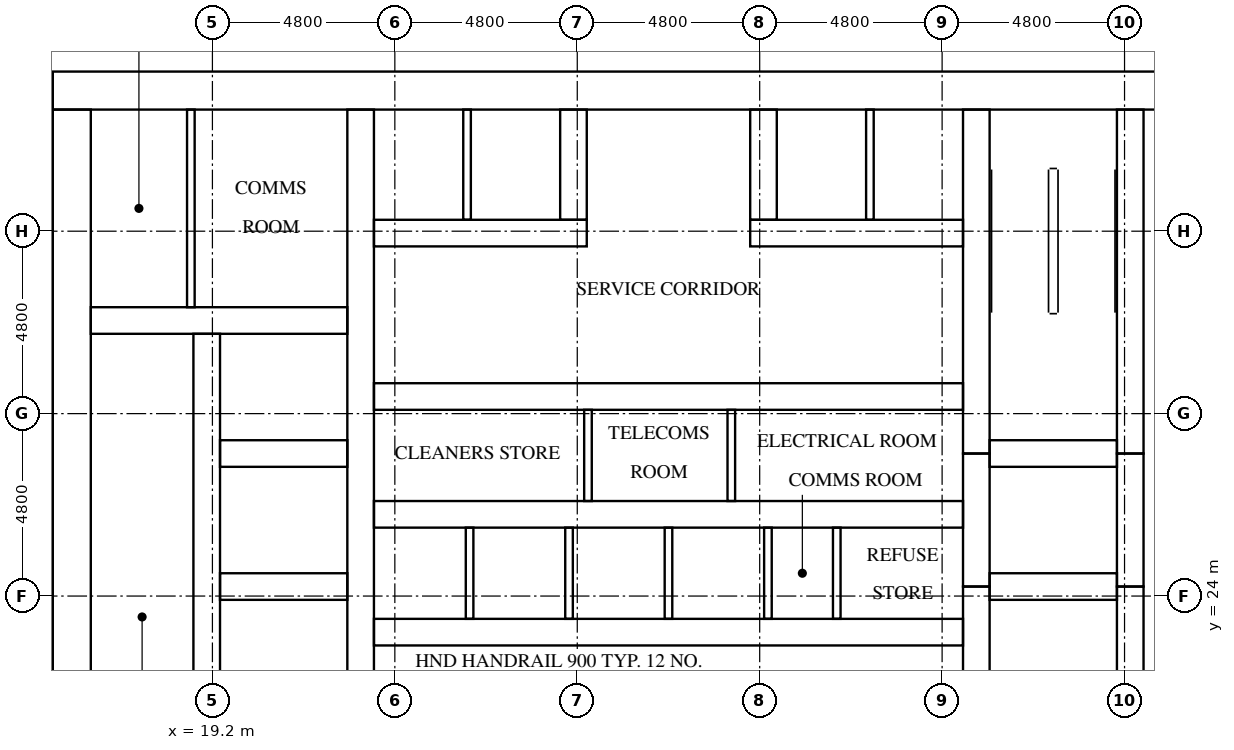
"""IFC4 building model, lengths in metres.
Left out: names, types, materials, properties, quantities, classifications, styles, units other than length and angle.
Written with IfcOpenShell. Run it as: python <this file> out.ifc"""

import sys

from ifc_helpers import new_model, si_unit, direction, frame, frame_2d, origin, place, context, subcontext, project, spatial, rectangle, extrude, element, fill, save


model = new_model("IFC4")
c1 = context("Model", 3, precision=1e-05, world=origin(), true_north=direction((0.0, 1.0)))
c2 = subcontext(c1, "Body", "Model", "MODEL_VIEW")
j1 = project(units=[si_unit("LENGTHUNIT", "METRE"), si_unit("PLANEANGLEUNIT", "RADIAN")], contexts=[c1])
p1 = place(None, origin())
s1 = spatial("IfcSite", under=j1, at=p1, CompositionType="ELEMENT")
p2 = place(p1, origin())
s2 = spatial("IfcBuilding", under=s1, at=p2, CompositionType="ELEMENT")
p3 = place(p2, frame((0.0, 0.0, 6.0)))
s3 = spatial("IfcBuildingStorey", under=s2, at=p3, CompositionType="ELEMENT", Elevation=6.0)
p4 = place(p3, frame((15.0, 37.3, 0.0), z_axis=(0.0, 0.0, 1.0), x_axis=(1.0, 0.0, 0.0)))
e1 = element("IfcWall", 1, at=p4, inside=s3, PredefinedType="SHEAR", context=c2, shape_type="SweptSolid", body=[
    extrude(rectangle(XDim=32.4, YDim=1.0, at=frame_2d((16.2, 0.0))), origin(), (0.0, 0.0, 1.0), 4.2),
])
p5 = place(p4, frame((15.3, 0.0, 0.0)))
e2 = element("IfcOpeningElement", 2, at=p5, cuts=e1, PredefinedType="OPENING", context=c2, shape_type="SweptSolid", body=[
    extrude(rectangle(XDim=1.8, YDim=2.1, at=frame_2d((0.9, 1.05))), frame((0.0, 0.51, 0.0), z_axis=(0.0, -1.0, 0.0), x_axis=(1.0, 0.0, 0.0)), (0.0, 0.0, 1.0), 1.02),
])
p6 = place(p4, frame((1.766, 0.0, 0.0)))
e3 = element("IfcOpeningElement", 3, at=p6, cuts=e1, PredefinedType="OPENING", context=c2, shape_type="SweptSolid", body=[
    extrude(rectangle(XDim=1.0, YDim=2.1, at=frame_2d((0.5, 1.05))), frame((0.0, 0.51, 0.0), z_axis=(0.0, -1.0, 0.0), x_axis=(1.0, 0.0, 0.0)), (0.0, 0.0, 1.0), 1.02),
])
p7 = place(p4, frame((5.241, 0.0, 0.0)))
e4 = element("IfcOpeningElement", 4, at=p7, cuts=e1, PredefinedType="OPENING", context=c2, shape_type="SweptSolid", body=[
    extrude(rectangle(XDim=1.0, YDim=2.1, at=frame_2d((0.5, 1.05))), frame((0.0, 0.51, 0.0), z_axis=(0.0, -1.0, 0.0), x_axis=(1.0, 0.0, 0.0)), (0.0, 0.0, 1.0), 1.02),
])
p8 = place(p3, frame((15.5, 16.0, 0.0), z_axis=(0.0, 0.0, 1.0), x_axis=(0.0, 1.0, 0.0)))
e5 = element("IfcWall", 5, at=p8, inside=s3, PredefinedType="SHEAR", context=c2, shape_type="SweptSolid", body=[
    extrude(rectangle(XDim=20.8, YDim=1.0, at=frame_2d((10.4, 0.0))), origin(), (0.0, 0.0, 1.0), 4.2),
])
p9 = place(p8, frame((4.76, 0.0, 0.0)))
e6 = element("IfcOpeningElement", 6, at=p9, cuts=e5, PredefinedType="OPENING", context=c2, shape_type="SweptSolid", body=[
    extrude(rectangle(XDim=1.2, YDim=2.1, at=frame_2d((0.6, 1.05))), frame((0.0, 0.51, 0.0), z_axis=(0.0, -1.0, 0.0), x_axis=(1.0, 0.0, 0.0)), (0.0, 0.0, 1.0), 1.02),
])
p10 = place(p3, frame((19.05, 16.0, 0.0), z_axis=(0.0, 0.0, 1.0), x_axis=(0.0, 1.0, 0.0)))
e7 = element("IfcWall", 7, at=p10, inside=s3, PredefinedType="SHEAR", context=c2, shape_type="SweptSolid", body=[
    extrude(rectangle(XDim=14.9, YDim=0.7, at=frame_2d((7.45, 0.0))), origin(), (0.0, 0.0, 1.0), 4.2),
])
p11 = place(p10, frame((9.45, 0.0, 0.0)))
e8 = element("IfcOpeningElement", 8, at=p11, cuts=e7, PredefinedType="OPENING", context=c2, shape_type="SweptSolid", body=[
    extrude(rectangle(XDim=1.1, YDim=2.1, at=frame_2d((0.55, 1.05))), frame((0.0, 0.36, 0.0), z_axis=(0.0, -1.0, 0.0), x_axis=(1.0, 0.0, 0.0)), (0.0, 0.0, 1.0), 0.72),
])
p12 = place(p10, frame((12.95, 0.0, 0.0)))
e9 = element("IfcOpeningElement", 9, at=p12, cuts=e7, PredefinedType="OPENING", context=c2, shape_type="SweptSolid", body=[
    extrude(rectangle(XDim=1.1, YDim=2.1, at=frame_2d((0.55, 1.05))), frame((0.0, 0.36, 0.0), z_axis=(0.0, -1.0, 0.0), x_axis=(1.0, 0.0, 0.0)), (0.0, 0.0, 1.0), 0.72),
])
p13 = place(p10, frame((0.2, 0.0, 0.0)))
e10 = element("IfcOpeningElement", 10, at=p13, cuts=e7, PredefinedType="OPENING", context=c2, shape_type="SweptSolid", body=[
    extrude(rectangle(XDim=1.2, YDim=2.1, at=frame_2d((0.6, 1.05))), frame((0.0, 0.36, 0.0), z_axis=(0.0, -1.0, 0.0), x_axis=(1.0, 0.0, 0.0)), (0.0, 0.0, 1.0), 0.72),
])
p14 = place(p3, frame((23.1, 16.0, 0.0), z_axis=(0.0, 0.0, 1.0), x_axis=(0.0, 1.0, 0.0)))
e11 = element("IfcWall", 11, at=p14, inside=s3, PredefinedType="SHEAR", context=c2, shape_type="SweptSolid", body=[
    extrude(rectangle(XDim=20.8, YDim=0.7, at=frame_2d((10.4, 0.0))), origin(), (0.0, 0.0, 1.0), 4.2),
])
p15 = place(p3, frame((39.3, 16.0, 0.0), z_axis=(0.0, 0.0, 1.0), x_axis=(0.0, 1.0, 0.0)))
e12 = element("IfcWall", 12, at=p15, inside=s3, PredefinedType="SHEAR", context=c2, shape_type="SweptSolid", body=[
    extrude(rectangle(XDim=8.25, YDim=0.7, at=frame_2d((4.125, 0.0))), origin(), (0.0, 0.0, 1.0), 4.2),
])
p16 = place(p3, frame((39.3, 24.25, 0.0), z_axis=(0.0, 0.0, 1.0), x_axis=(0.0, 1.0, 0.0)))
e13 = element("IfcWall", 13, at=p16, inside=s3, PredefinedType="SHEAR", context=c2, shape_type="SweptSolid", body=[
    extrude(rectangle(XDim=3.5, YDim=0.7, at=frame_2d((1.75, 0.0))), origin(), (0.0, 0.0, 1.0), 4.2),
])
p17 = place(p3, frame((39.3, 27.75, 0.0), z_axis=(0.0, 0.0, 1.0), x_axis=(0.0, 1.0, 0.0)))
e14 = element("IfcWall", 14, at=p17, inside=s3, PredefinedType="SHEAR", context=c2, shape_type="SweptSolid", body=[
    extrude(rectangle(XDim=9.05, YDim=0.7, at=frame_2d((4.525, 0.0))), origin(), (0.0, 0.0, 1.0), 4.2),
])
p18 = place(p3, frame((43.35, 16.0, 0.0), z_axis=(0.0, 0.0, 1.0), x_axis=(0.0, 1.0, 0.0)))
e15 = element("IfcWall", 15, at=p18, inside=s3, PredefinedType="SHEAR", context=c2, shape_type="SweptSolid", body=[
    extrude(rectangle(XDim=8.25, YDim=0.7, at=frame_2d((4.125, 0.0))), origin(), (0.0, 0.0, 1.0), 4.2),
])
p19 = place(p18, frame((0.2, 0.0, 0.0)))
e16 = element("IfcOpeningElement", 16, at=p19, cuts=e15, PredefinedType="OPENING", context=c2, shape_type="SweptSolid", body=[
    extrude(rectangle(XDim=1.2, YDim=2.1, at=frame_2d((0.6, 1.05))), frame((0.0, 0.36, 0.0), z_axis=(0.0, -1.0, 0.0), x_axis=(1.0, 0.0, 0.0)), (0.0, 0.0, 1.0), 0.72),
])
p20 = place(p3, frame((43.35, 24.25, 0.0), z_axis=(0.0, 0.0, 1.0), x_axis=(0.0, 1.0, 0.0)))
e17 = element("IfcWall", 17, at=p20, inside=s3, PredefinedType="SHEAR", context=c2, shape_type="SweptSolid", body=[
    extrude(rectangle(XDim=3.5, YDim=0.7, at=frame_2d((1.75, 0.0))), origin(), (0.0, 0.0, 1.0), 4.2),
])
p21 = place(p20, frame((1.2, 0.0, 0.0)))
e18 = element("IfcOpeningElement", 18, at=p21, cuts=e17, PredefinedType="OPENING", context=c2, shape_type="SweptSolid", body=[
    extrude(rectangle(XDim=1.1, YDim=2.1, at=frame_2d((0.55, 1.05))), frame((0.0, 0.36, 0.0), z_axis=(0.0, -1.0, 0.0), x_axis=(1.0, 0.0, 0.0)), (0.0, 0.0, 1.0), 0.72),
])
p22 = place(p3, frame((43.35, 27.75, 0.0), z_axis=(0.0, 0.0, 1.0), x_axis=(0.0, 1.0, 0.0)))
e19 = element("IfcWall", 19, at=p22, inside=s3, PredefinedType="SHEAR", context=c2, shape_type="SweptSolid", body=[
    extrude(rectangle(XDim=9.05, YDim=0.7, at=frame_2d((4.525, 0.0))), origin(), (0.0, 0.0, 1.0), 4.2),
])
p23 = place(p22, frame((7.65, 0.0, 0.0)))
e20 = element("IfcOpeningElement", 20, at=p23, cuts=e19, PredefinedType="OPENING", context=c2, shape_type="SweptSolid", body=[
    extrude(rectangle(XDim=1.2, YDim=2.1, at=frame_2d((0.6, 1.05))), frame((0.0, 0.36, 0.0), z_axis=(0.0, -1.0, 0.0), x_axis=(1.0, 0.0, 0.0)), (0.0, 0.0, 1.0), 0.72),
])
for number, where, z_axis, x_axis in (
    (21, (19.4, 24.25, 0.0), (0.0, 0.0, 1.0), (1.0, 0.0, 0.0)),
    (22, (19.4, 27.75, 0.0), (0.0, 0.0, 1.0), (1.0, 0.0, 0.0)),
):
    element("IfcWall", number, at=place(p3, frame(where, z_axis=z_axis, x_axis=x_axis)), inside=s3, PredefinedType="SHEAR", context=c2, shape_type="SweptSolid", body=[
        extrude(rectangle(XDim=3.35, YDim=0.7, at=frame_2d((1.675, 0.0))), origin(), (0.0, 0.0, 1.0), 4.2),
    ])
p24 = place(p3, frame((16.0, 31.25, 0.0), z_axis=(0.0, 0.0, 1.0), x_axis=(1.0, 0.0, 0.0)))
e23 = element("IfcWall", 23, at=p24, inside=s3, PredefinedType="SHEAR", context=c2, shape_type="SweptSolid", body=[
    extrude(rectangle(XDim=6.75, YDim=0.7, at=frame_2d((3.375, 0.0))), origin(), (0.0, 0.0, 1.0), 4.2),
])
for number, where, z_axis, x_axis in (
    (24, (39.65, 24.25, 0.0), (0.0, 0.0, 1.0), (1.0, 0.0, 0.0)),
    (25, (39.65, 27.75, 0.0), (0.0, 0.0, 1.0), (1.0, 0.0, 0.0)),
):
    element("IfcWall", number, at=place(p3, frame(where, z_axis=z_axis, x_axis=x_axis)), inside=s3, PredefinedType="SHEAR", context=c2, shape_type="SweptSolid", body=[
        extrude(rectangle(XDim=3.35, YDim=0.7, at=frame_2d((1.675, 0.0))), origin(), (0.0, 0.0, 1.0), 4.2),
    ])
p25 = place(p3, frame((23.45, 23.05, 0.0), z_axis=(0.0, 0.0, 1.0), x_axis=(1.0, 0.0, 0.0)))
e26 = element("IfcWall", 26, at=p25, inside=s3, PredefinedType="SHEAR", context=c2, shape_type="SweptSolid", body=[
    extrude(rectangle(XDim=15.5, YDim=0.7, at=frame_2d((7.75, 0.0))), origin(), (0.0, 0.0, 1.0), 4.2),
])
p26 = place(p25, frame((0.658, 0.0, 0.0)))
e27 = element("IfcOpeningElement", 27, at=p26, cuts=e26, PredefinedType="OPENING", context=c2, shape_type="SweptSolid", body=[
    extrude(rectangle(XDim=1.1, YDim=2.1, at=frame_2d((0.55, 1.05))), frame((0.0, 0.36, 0.0), z_axis=(0.0, -1.0, 0.0), x_axis=(1.0, 0.0, 0.0)), (0.0, 0.0, 1.0), 0.72),
])
p27 = place(p25, frame((3.275, 0.0, 0.0)))
e28 = element("IfcOpeningElement", 28, at=p27, cuts=e26, PredefinedType="OPENING", context=c2, shape_type="SweptSolid", body=[
    extrude(rectangle(XDim=1.1, YDim=2.1, at=frame_2d((0.55, 1.05))), frame((0.0, 0.36, 0.0), z_axis=(0.0, -1.0, 0.0), x_axis=(1.0, 0.0, 0.0)), (0.0, 0.0, 1.0), 0.72),
])
p28 = place(p25, frame((10.772, 0.0, 0.0)))
e29 = element("IfcOpeningElement", 29, at=p28, cuts=e26, PredefinedType="OPENING", context=c2, shape_type="SweptSolid", body=[
    extrude(rectangle(XDim=1.0, YDim=2.1, at=frame_2d((0.5, 1.05))), frame((0.0, 0.36, 0.0), z_axis=(0.0, -1.0, 0.0), x_axis=(1.0, 0.0, 0.0)), (0.0, 0.0, 1.0), 0.72),
])
p29 = place(p25, frame((13.389, 0.0, 0.0)))
e30 = element("IfcOpeningElement", 30, at=p29, cuts=e26, PredefinedType="OPENING", context=c2, shape_type="SweptSolid", body=[
    extrude(rectangle(XDim=1.0, YDim=2.1, at=frame_2d((0.5, 1.05))), frame((0.0, 0.36, 0.0), z_axis=(0.0, -1.0, 0.0), x_axis=(1.0, 0.0, 0.0)), (0.0, 0.0, 1.0), 0.72),
])
p30 = place(p3, frame((23.45, 26.15, 0.0), z_axis=(0.0, 0.0, 1.0), x_axis=(1.0, 0.0, 0.0)))
e31 = element("IfcWall", 31, at=p30, inside=s3, PredefinedType="SHEAR", context=c2, shape_type="SweptSolid", body=[
    extrude(rectangle(XDim=15.5, YDim=0.7, at=frame_2d((7.75, 0.0))), origin(), (0.0, 0.0, 1.0), 4.2),
])
p31 = place(p3, frame((23.45, 29.25, 0.0), z_axis=(0.0, 0.0, 1.0), x_axis=(1.0, 0.0, 0.0)))
e32 = element("IfcWall", 32, at=p31, inside=s3, PredefinedType="SHEAR", context=c2, shape_type="SweptSolid", body=[
    extrude(rectangle(XDim=15.5, YDim=0.7, at=frame_2d((7.75, 0.0))), origin(), (0.0, 0.0, 1.0), 4.2),
])
p32 = place(p31, frame((2.266, 0.0, 0.0)))
e33 = element("IfcOpeningElement", 33, at=p32, cuts=e32, PredefinedType="OPENING", context=c2, shape_type="SweptSolid", body=[
    extrude(rectangle(XDim=1.0, YDim=2.1, at=frame_2d((0.5, 1.05))), frame((0.0, 0.36, 0.0), z_axis=(0.0, -1.0, 0.0), x_axis=(1.0, 0.0, 0.0)), (0.0, 0.0, 1.0), 0.72),
])
p33 = place(p31, frame((7.018, 0.0, 0.0)))
e34 = element("IfcOpeningElement", 34, at=p33, cuts=e32, PredefinedType="OPENING", context=c2, shape_type="SweptSolid", body=[
    extrude(rectangle(XDim=1.0, YDim=2.1, at=frame_2d((0.5, 1.05))), frame((0.0, 0.36, 0.0), z_axis=(0.0, -1.0, 0.0), x_axis=(1.0, 0.0, 0.0)), (0.0, 0.0, 1.0), 0.72),
])
p34 = place(p31, frame((12.002, 0.0, 0.0)))
e35 = element("IfcOpeningElement", 35, at=p34, cuts=e32, PredefinedType="OPENING", context=c2, shape_type="SweptSolid", body=[
    extrude(rectangle(XDim=1.0, YDim=2.1, at=frame_2d((0.5, 1.05))), frame((0.0, 0.36, 0.0), z_axis=(0.0, -1.0, 0.0), x_axis=(1.0, 0.0, 0.0)), (0.0, 0.0, 1.0), 0.72),
])
p35 = place(p3, frame((23.45, 33.55, 0.0), z_axis=(0.0, 0.0, 1.0), x_axis=(1.0, 0.0, 0.0)))
e36 = element("IfcWall", 36, at=p35, inside=s3, PredefinedType="SHEAR", context=c2, shape_type="SweptSolid", body=[
    extrude(rectangle(XDim=5.6, YDim=0.7, at=frame_2d((2.8, 0.0))), origin(), (0.0, 0.0, 1.0), 4.2),
])
p36 = place(p3, frame((33.35, 33.55, 0.0), z_axis=(0.0, 0.0, 1.0), x_axis=(1.0, 0.0, 0.0)))
e37 = element("IfcWall", 37, at=p36, inside=s3, PredefinedType="SHEAR", context=c2, shape_type="SweptSolid", body=[
    extrude(rectangle(XDim=5.6, YDim=0.7, at=frame_2d((2.8, 0.0))), origin(), (0.0, 0.0, 1.0), 4.2),
])
for number, where, z_axis, x_axis in (
    (38, (28.7, 33.9, 0.0), (0.0, 0.0, 1.0), (0.0, 1.0, 0.0)),
    (39, (33.7, 33.9, 0.0), (0.0, 0.0, 1.0), (0.0, 1.0, 0.0)),
):
    element("IfcWall", number, at=place(p3, frame(where, z_axis=z_axis, x_axis=x_axis)), inside=s3, PredefinedType="SHEAR", context=c2, shape_type="SweptSolid", body=[
        extrude(rectangle(XDim=2.9, YDim=0.7, at=frame_2d((1.45, 0.0))), origin(), (0.0, 0.0, 1.0), 4.2),
    ])
for number, where, z_axis, x_axis in (
    (40, (25.967, 23.4, 0.0), (0.0, 0.0, 1.0), (0.0, 1.0, 0.0)),
    (41, (28.583, 23.4, 0.0), (0.0, 0.0, 1.0), (0.0, 1.0, 0.0)),
    (42, (31.2, 23.4, 0.0), (0.0, 0.0, 1.0), (0.0, 1.0, 0.0)),
    (43, (33.817, 23.4, 0.0), (0.0, 0.0, 1.0), (0.0, 1.0, 0.0)),
):
    element("IfcWall", number, at=place(p3, frame(where, z_axis=z_axis, x_axis=x_axis)), inside=s3, PredefinedType="SOLIDWALL", context=c2, shape_type="SweptSolid", body=[
        extrude(rectangle(XDim=2.4, YDim=0.2, at=frame_2d((1.2, 0.0))), origin(), (0.0, 0.0, 1.0), 4.2),
    ])
for number, where, z_axis, x_axis in (
    (44, (25.9, 33.9, 0.0), (0.0, 0.0, 1.0), (0.0, 1.0, 0.0)),
    (45, (36.5, 33.9, 0.0), (0.0, 0.0, 1.0), (0.0, 1.0, 0.0)),
):
    element("IfcWall", number, at=place(p3, frame(where, z_axis=z_axis, x_axis=x_axis)), inside=s3, PredefinedType="SOLIDWALL", context=c2, shape_type="SweptSolid", body=[
        extrude(rectangle(XDim=2.9, YDim=0.2, at=frame_2d((1.45, 0.0))), origin(), (0.0, 0.0, 1.0), 4.2),
    ])
p37 = place(p3, frame((18.633, 31.6, 0.0), z_axis=(0.0, 0.0, 1.0), x_axis=(0.0, 1.0, 0.0)))
e46 = element("IfcWall", 46, at=p37, inside=s3, PredefinedType="PARTITIONING", context=c2, shape_type="SweptSolid", body=[
    extrude(rectangle(XDim=5.2, YDim=0.2, at=frame_2d((2.6, 0.0))), origin(), (0.0, 0.0, 1.0), 4.2),
])
p38 = place(p3, frame((35.628, 23.4, 0.0), z_axis=(0.0, 0.0, 1.0), x_axis=(0.0, 1.0, 0.0)))
e47 = element("IfcWall", 47, at=p38, inside=s3, PredefinedType="PARTITIONING", context=c2, shape_type="SweptSolid", body=[
    extrude(rectangle(XDim=2.4, YDim=0.2, at=frame_2d((1.2, 0.0))), origin(), (0.0, 0.0, 1.0), 4.2),
])
for number, where, z_axis, x_axis in (
    (48, (29.082, 26.5, 0.0), (0.0, 0.0, 1.0), (0.0, 1.0, 0.0)),
    (49, (32.853, 26.5, 0.0), (0.0, 0.0, 1.0), (0.0, 1.0, 0.0)),
):
    element("IfcWall", number, at=place(p3, frame(where, z_axis=z_axis, x_axis=x_axis)), inside=s3, PredefinedType="PARTITIONING", context=c2, shape_type="SweptSolid", body=[
        extrude(rectangle(XDim=2.4, YDim=0.2, at=frame_2d((1.2, 0.0))), origin(), (0.0, 0.0, 1.0), 4.2),
    ])
p39 = place(p26, origin())
e50 = element("IfcDoor", 50, at=p39, inside=s3, OperationType="DOUBLE_DOOR_SLIDING", PredefinedType="DOOR", context=c2, shape_type="SweptSolid", body=[
    extrude(rectangle(XDim=1.1, YDim=2.1, at=frame_2d((0.55, 1.05))), frame((0.0, 0.025, 0.0), z_axis=(0.0, -1.0, 0.0), x_axis=(1.0, 0.0, 0.0)), (0.0, 0.0, 1.0), 0.05),
])
fill(e27, e50)
p40 = place(p27, origin())
e51 = element("IfcDoor", 51, at=p40, inside=s3, OperationType="DOUBLE_DOOR_SLIDING", PredefinedType="DOOR", context=c2, shape_type="SweptSolid", body=[
    extrude(rectangle(XDim=1.1, YDim=2.1, at=frame_2d((0.55, 1.05))), frame((0.0, 0.025, 0.0), z_axis=(0.0, -1.0, 0.0), x_axis=(1.0, 0.0, 0.0)), (0.0, 0.0, 1.0), 0.05),
])
fill(e28, e51)
p41 = place(p11, origin())
e52 = element("IfcDoor", 52, at=p41, inside=s3, OperationType="DOUBLE_DOOR_SLIDING", PredefinedType="DOOR", context=c2, shape_type="SweptSolid", body=[
    extrude(rectangle(XDim=1.1, YDim=2.1, at=frame_2d((0.55, 1.05))), frame((0.0, 0.025, 0.0), z_axis=(0.0, -1.0, 0.0), x_axis=(1.0, 0.0, 0.0)), (0.0, 0.0, 1.0), 0.05),
])
fill(e8, e52)
p42 = place(p12, origin())
e53 = element("IfcDoor", 53, at=p42, inside=s3, OperationType="DOUBLE_DOOR_SLIDING", PredefinedType="DOOR", context=c2, shape_type="SweptSolid", body=[
    extrude(rectangle(XDim=1.1, YDim=2.1, at=frame_2d((0.55, 1.05))), frame((0.0, 0.025, 0.0), z_axis=(0.0, -1.0, 0.0), x_axis=(1.0, 0.0, 0.0)), (0.0, 0.0, 1.0), 0.05),
])
fill(e9, e53)
p43 = place(p21, origin())
e54 = element("IfcDoor", 54, at=p43, inside=s3, OperationType="DOUBLE_DOOR_SLIDING", PredefinedType="DOOR", context=c2, shape_type="SweptSolid", body=[
    extrude(rectangle(XDim=1.1, YDim=2.1, at=frame_2d((0.55, 1.05))), frame((0.0, 0.025, 0.0), z_axis=(0.0, -1.0, 0.0), x_axis=(1.0, 0.0, 0.0)), (0.0, 0.0, 1.0), 0.05),
])
fill(e18, e54)
p44 = place(p23, origin())
e55 = element("IfcDoor", 55, at=p44, inside=s3, OperationType="SINGLE_SWING_LEFT", PredefinedType="DOOR", context=c2, shape_type="SweptSolid", body=[
    extrude(rectangle(XDim=1.2, YDim=2.1, at=frame_2d((0.6, 1.05))), frame((0.0, 0.025, 0.0), z_axis=(0.0, -1.0, 0.0), x_axis=(1.0, 0.0, 0.0)), (0.0, 0.0, 1.0), 0.05),
])
fill(e20, e55)
p45 = place(p5, origin())
e56 = element("IfcDoor", 56, at=p45, inside=s3, OperationType="DOUBLE_DOOR_SINGLE_SWING", PredefinedType="DOOR", context=c2, shape_type="SweptSolid", body=[
    extrude(rectangle(XDim=1.8, YDim=2.1, at=frame_2d((0.9, 1.05))), frame((0.0, 0.025, 0.0), z_axis=(0.0, -1.0, 0.0), x_axis=(1.0, 0.0, 0.0)), (0.0, 0.0, 1.0), 0.05),
])
fill(e2, e56)
p46 = place(p6, origin())
e57 = element("IfcDoor", 57, at=p46, inside=s3, OperationType="SINGLE_SWING_RIGHT", PredefinedType="DOOR", context=c2, shape_type="SweptSolid", body=[
    extrude(rectangle(XDim=1.0, YDim=2.1, at=frame_2d((0.5, 1.05))), frame((0.0, 0.025, 0.0), z_axis=(0.0, -1.0, 0.0), x_axis=(1.0, 0.0, 0.0)), (0.0, 0.0, 1.0), 0.05),
])
fill(e3, e57)
p47 = place(p7, origin())
e58 = element("IfcDoor", 58, at=p47, inside=s3, OperationType="SINGLE_SWING_LEFT", PredefinedType="DOOR", context=c2, shape_type="SweptSolid", body=[
    extrude(rectangle(XDim=1.0, YDim=2.1, at=frame_2d((0.5, 1.05))), frame((0.0, 0.025, 0.0), z_axis=(0.0, -1.0, 0.0), x_axis=(1.0, 0.0, 0.0)), (0.0, 0.0, 1.0), 0.05),
])
fill(e4, e58)
p48 = place(p28, frame((1.0, 0.0, 0.0), z_axis=(0.0, 0.0, 1.0), x_axis=(-1.0, 0.0, 0.0)))
e59 = element("IfcDoor", 59, at=p48, inside=s3, OperationType="SINGLE_SWING_RIGHT", PredefinedType="DOOR", context=c2, shape_type="SweptSolid", body=[
    extrude(rectangle(XDim=1.0, YDim=2.1, at=frame_2d((0.5, 1.05))), frame((0.0, 0.025, 0.0), z_axis=(0.0, -1.0, 0.0), x_axis=(1.0, 0.0, 0.0)), (0.0, 0.0, 1.0), 0.05),
])
fill(e29, e59)
p49 = place(p29, frame((1.0, 0.0, 0.0), z_axis=(0.0, 0.0, 1.0), x_axis=(-1.0, 0.0, 0.0)))
e60 = element("IfcDoor", 60, at=p49, inside=s3, OperationType="SINGLE_SWING_LEFT", PredefinedType="DOOR", context=c2, shape_type="SweptSolid", body=[
    extrude(rectangle(XDim=1.0, YDim=2.1, at=frame_2d((0.5, 1.05))), frame((0.0, 0.025, 0.0), z_axis=(0.0, -1.0, 0.0), x_axis=(1.0, 0.0, 0.0)), (0.0, 0.0, 1.0), 0.05),
])
fill(e30, e60)
p50 = place(p32, origin())
e61 = element("IfcDoor", 61, at=p50, inside=s3, OperationType="SINGLE_SWING_RIGHT", PredefinedType="DOOR", context=c2, shape_type="SweptSolid", body=[
    extrude(rectangle(XDim=1.0, YDim=2.1, at=frame_2d((0.5, 1.05))), frame((0.0, 0.025, 0.0), z_axis=(0.0, -1.0, 0.0), x_axis=(1.0, 0.0, 0.0)), (0.0, 0.0, 1.0), 0.05),
])
fill(e33, e61)
p51 = place(p33, origin())
e62 = element("IfcDoor", 62, at=p51, inside=s3, OperationType="SINGLE_SWING_LEFT", PredefinedType="DOOR", context=c2, shape_type="SweptSolid", body=[
    extrude(rectangle(XDim=1.0, YDim=2.1, at=frame_2d((0.5, 1.05))), frame((0.0, 0.025, 0.0), z_axis=(0.0, -1.0, 0.0), x_axis=(1.0, 0.0, 0.0)), (0.0, 0.0, 1.0), 0.05),
])
fill(e34, e62)
p52 = place(p34, origin())
e63 = element("IfcDoor", 63, at=p52, inside=s3, OperationType="SINGLE_SWING_RIGHT", PredefinedType="DOOR", context=c2, shape_type="SweptSolid", body=[
    extrude(rectangle(XDim=1.0, YDim=2.1, at=frame_2d((0.5, 1.05))), frame((0.0, 0.025, 0.0), z_axis=(0.0, -1.0, 0.0), x_axis=(1.0, 0.0, 0.0)), (0.0, 0.0, 1.0), 0.05),
])
fill(e35, e63)
save(model, sys.argv[1])
